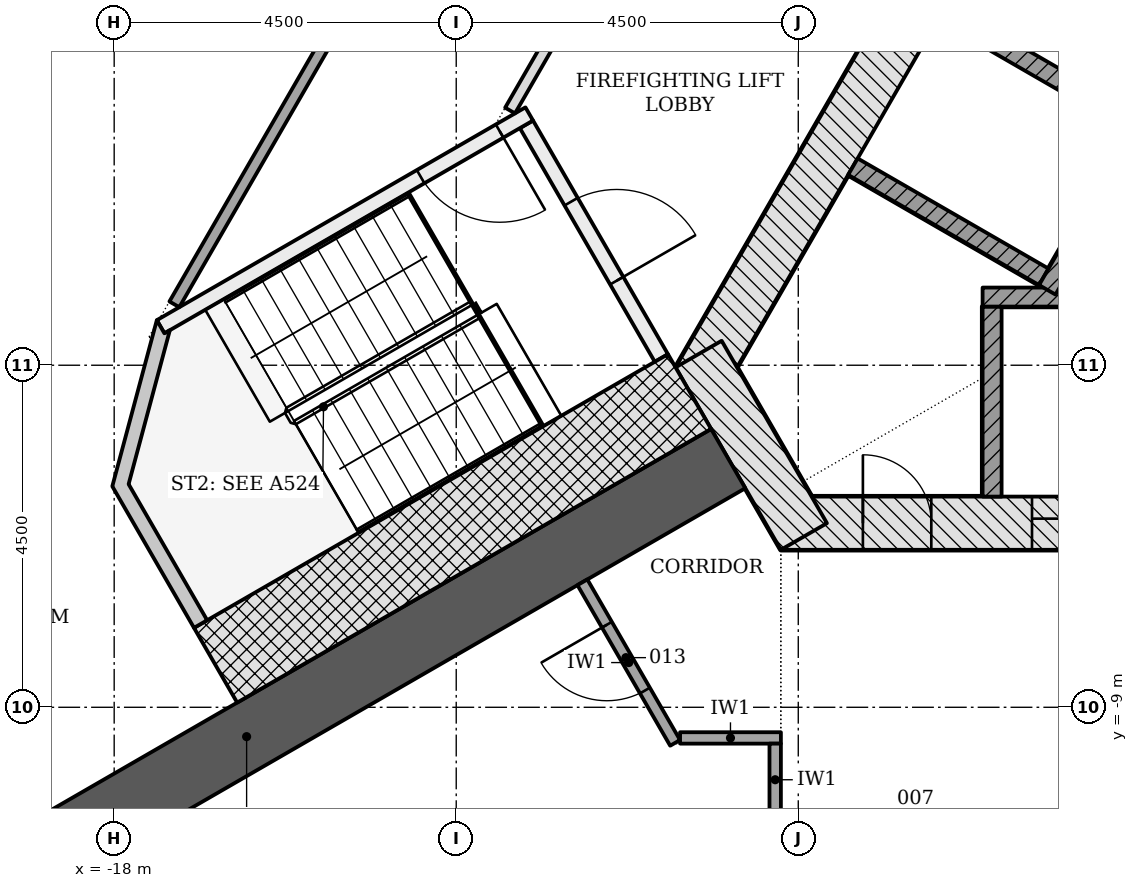
"""IFC4 building model, lengths in metres.
Left out: names, types, materials, properties, quantities, classifications, styles, units other than length and angle.
Written with IfcOpenShell. Run it as: python <this file> out.ifc"""

import sys

from ifc_helpers import new_model, si_unit, direction, frame, frame_2d, origin, place, context, subcontext, project, spatial, polyline, rectangle, outline, extrude, element, fill, save


model = new_model("IFC4")
c1 = context("Model", 3, precision=1e-05, world=origin(), true_north=direction((0.0, 1.0)))
c2 = subcontext(c1, "Body", "Model", "MODEL_VIEW")
j1 = project(units=[si_unit("LENGTHUNIT", "METRE"), si_unit("PLANEANGLEUNIT", "RADIAN")], contexts=[c1])
p1 = place(None, origin())
s1 = spatial("IfcSite", under=j1, at=p1, CompositionType="ELEMENT")
p2 = place(p1, origin())
s2 = spatial("IfcBuilding", under=s1, at=p2, CompositionType="ELEMENT")
p3 = place(p2, frame((0.0, 0.0, 24.0)))
s3 = spatial("IfcBuildingStorey", under=s2, at=p3, CompositionType="ELEMENT", Elevation=24.0)
p4 = place(p3, frame((-9.229, -6.578, -0.2), z_axis=(0.0, 0.0, 1.0), x_axis=(1.0, 0.0, 0.0)))
e1 = element("IfcWall", 1, at=p4, inside=s3, PredefinedType="SHEAR", context=c2, shape_type="SweptSolid", body=[
    extrude(rectangle(XDim=18.458, YDim=0.7, at=frame_2d((9.229, 0.0))), origin(), (0.0, 0.0, 1.0), 3.6),
])
p5 = place(p4, frame((3.304, 0.0, 0.2)))
e2 = element("IfcOpeningElement", 2, at=p5, cuts=e1, PredefinedType="OPENING", context=c2, shape_type="SweptSolid", body=[
    extrude(rectangle(XDim=1.1, YDim=2.1, at=frame_2d((0.55, 1.05))), frame((0.0, 0.36, 0.0), z_axis=(0.0, -1.0, 0.0), x_axis=(1.0, 0.0, 0.0)), (0.0, 0.0, 1.0), 0.72),
])
p6 = place(p4, frame((5.454, 0.0, 0.2)))
e3 = element("IfcOpeningElement", 3, at=p6, cuts=e1, PredefinedType="OPENING", context=c2, shape_type="SweptSolid", body=[
    extrude(rectangle(XDim=1.1, YDim=2.1, at=frame_2d((0.55, 1.05))), frame((0.0, 0.36, 0.0), z_axis=(0.0, -1.0, 0.0), x_axis=(1.0, 0.0, 0.0)), (0.0, 0.0, 1.0), 0.72),
])
p7 = place(p4, frame((7.604, 0.0, 0.2)))
e4 = element("IfcOpeningElement", 4, at=p7, cuts=e1, PredefinedType="OPENING", context=c2, shape_type="SweptSolid", body=[
    extrude(rectangle(XDim=1.1, YDim=2.1, at=frame_2d((0.55, 1.05))), frame((0.0, 0.36, 0.0), z_axis=(0.0, -1.0, 0.0), x_axis=(1.0, 0.0, 0.0)), (0.0, 0.0, 1.0), 0.72),
])
p8 = place(p4, frame((9.754, 0.0, 0.2)))
e5 = element("IfcOpeningElement", 5, at=p8, cuts=e1, PredefinedType="OPENING", context=c2, shape_type="SweptSolid", body=[
    extrude(rectangle(XDim=1.1, YDim=2.1, at=frame_2d((0.55, 1.05))), frame((0.0, 0.36, 0.0), z_axis=(0.0, -1.0, 0.0), x_axis=(1.0, 0.0, 0.0)), (0.0, 0.0, 1.0), 0.72),
])
p9 = place(p4, frame((11.904, 0.0, 0.2)))
e6 = element("IfcOpeningElement", 6, at=p9, cuts=e1, PredefinedType="OPENING", context=c2, shape_type="SweptSolid", body=[
    extrude(rectangle(XDim=1.1, YDim=2.1, at=frame_2d((0.55, 1.05))), frame((0.0, 0.36, 0.0), z_axis=(0.0, -1.0, 0.0), x_axis=(1.0, 0.0, 0.0)), (0.0, 0.0, 1.0), 0.72),
])
p10 = place(p4, frame((14.054, 0.0, 0.2)))
e7 = element("IfcOpeningElement", 7, at=p10, cuts=e1, PredefinedType="OPENING", context=c2, shape_type="SweptSolid", body=[
    extrude(rectangle(XDim=1.1, YDim=2.1, at=frame_2d((0.55, 1.05))), frame((0.0, 0.36, 0.0), z_axis=(0.0, -1.0, 0.0), x_axis=(1.0, 0.0, 0.0)), (0.0, 0.0, 1.0), 0.72),
])
p11 = place(p4, frame((1.079, 0.0, 0.2)))
e8 = element("IfcOpeningElement", 8, at=p11, cuts=e1, PredefinedType="OPENING", context=c2, shape_type="SweptSolid", body=[
    extrude(rectangle(XDim=0.9, YDim=2.1, at=frame_2d((0.45, 1.05))), frame((0.0, 0.36, 0.0), z_axis=(0.0, -1.0, 0.0), x_axis=(1.0, 0.0, 0.0)), (0.0, 0.0, 1.0), 0.72),
])
p12 = place(p3, frame((-1.083, 11.281, -0.2), z_axis=(0.0, 0.0, 1.0), x_axis=(-0.500001446645, -0.866024568562, 0.0)))
e9 = element("IfcWall", 9, at=p12, inside=s3, PredefinedType="SHEAR", context=c2, shape_type="SweptSolid", body=[
    extrude(rectangle(XDim=18.458, YDim=0.7, at=frame_2d((9.229, 0.0))), origin(), (0.0, 0.0, 1.0), 3.6),
])
p13 = place(p12, frame((8.979, 0.0, 0.2)))
e10 = element("IfcOpeningElement", 10, at=p13, cuts=e9, PredefinedType="OPENING", context=c2, shape_type="SweptSolid", body=[
    extrude(rectangle(XDim=1.2, YDim=2.1, at=frame_2d((0.6, 1.05))), frame((0.0, 0.36, 0.0), z_axis=(0.0, -1.0, 0.0), x_axis=(1.0, 0.0, 0.0)), (0.0, 0.0, 1.0), 0.72),
])
p14 = place(p12, frame((11.029, 0.0, 0.2)))
e11 = element("IfcOpeningElement", 11, at=p14, cuts=e9, PredefinedType="OPENING", context=c2, shape_type="SweptSolid", body=[
    extrude(rectangle(XDim=1.2, YDim=2.1, at=frame_2d((0.6, 1.05))), frame((0.0, 0.36, 0.0), z_axis=(0.0, -1.0, 0.0), x_axis=(1.0, 0.0, 0.0)), (0.0, 0.0, 1.0), 0.72),
])
p15 = place(p3, frame((-10.311, -4.353, -0.2), z_axis=(0.0, 0.0, 1.0), x_axis=(0.500042739161, -0.866000726912, 0.0)))
e12 = element("IfcWall", 12, at=p15, inside=s3, PredefinedType="SHEAR", context=c2, shape_type="SweptSolid", body=[
    extrude(rectangle(XDim=2.771, YDim=0.7, at=frame_2d((1.386, 0.0))), origin(), (0.0, 0.0, 1.0), 3.6),
])
p16 = place(p3, frame((-9.922, -5.728, -0.2), z_axis=(0.0, 0.0, 1.0), x_axis=(-0.866028046028, -0.499995423472, 0.0)))
e13 = element("IfcWall", 13, at=p16, inside=s3, PredefinedType="SHEAR", context=c2, shape_type="SweptSolid", body=[
    extrude(rectangle(XDim=14.633, YDim=0.9, at=frame_2d((7.316, 0.0))), origin(), (0.0, 0.0, 1.0), 3.6),
])
p17 = place(p3, frame((-6.45, -6.228, -0.2), z_axis=(0.0, 0.0, 1.0), x_axis=(0.0, 1.0, 0.0)))
e14 = element("IfcWall", 14, at=p17, inside=s3, PredefinedType="PARTITIONING", context=c2, shape_type="SweptSolid", body=[
    extrude(rectangle(XDim=2.5, YDim=0.25, at=frame_2d((1.25, 0.0))), origin(), (0.0, 0.0, 1.0), 3.6),
])
p18 = place(p3, frame((-6.575, -3.603, 0.0), z_axis=(0.0, 0.0, 1.0), x_axis=(1.0, 0.0, 0.0)))
e15 = element("IfcWall", 15, at=p18, inside=s3, PredefinedType="PARTITIONING", context=c2, shape_type="SweptSolid", body=[
    extrude(rectangle(XDim=13.15, YDim=0.25, at=frame_2d((6.575, 0.0))), origin(), (0.0, 0.0, 1.0), 3.4),
])
for number, where, z_axis, x_axis in (
    (16, (-7.106, 0.148, -0.2), (0.0, 0.0, 1.0), (0.866, -0.5, 0.0)),
    (17, (-8.281, -1.887, -0.2), (0.0, 0.0, 1.0), (0.866, -0.5, 0.0)),
):
    element("IfcWall", number, at=place(p3, frame(where, z_axis=z_axis, x_axis=x_axis)), inside=s3, PredefinedType="PARTITIONING", context=c2, shape_type="SweptSolid", body=[
        extrude(rectangle(XDim=2.9, YDim=0.25, at=frame_2d((1.45, 0.0))), origin(), (0.0, 0.0, 1.0), 3.6),
    ])
p19 = place(p3, frame((0.176, 6.711, 0.0), z_axis=(0.0, 0.0, 1.0), x_axis=(-0.500004227369, -0.866022963098, 0.0)))
e18 = element("IfcWall", 18, at=p19, inside=s3, PredefinedType="PARTITIONING", context=c2, shape_type="SweptSolid", body=[
    extrude(rectangle(XDim=11.8, YDim=0.25, at=frame_2d((5.9, 0.0))), origin(), (0.0, 0.0, 1.0), 3.4),
])
p20 = place(p3, frame((-12.576, -1.331, -0.2), z_axis=(0.0, 0.0, 1.0), x_axis=(0.499970499736, -0.8660424351, 0.0)))
e19 = element("IfcWall", 19, at=p20, inside=s3, PredefinedType="SHEAR", context=c2, shape_type="SweptSolid", body=[
    extrude(rectangle(XDim=3.55, YDim=0.2, at=frame_2d((1.775, 0.0))), origin(), (0.0, 0.0, 1.0), 3.6),
])
p21 = place(p20, frame((1.175, 0.0, 0.2)))
e20 = element("IfcOpeningElement", 20, at=p21, cuts=e19, PredefinedType="OPENING", context=c2, shape_type="SweptSolid", body=[
    extrude(rectangle(XDim=1.2, YDim=2.1, at=frame_2d((0.6, 1.05))), frame((0.0, 0.11, 0.0), z_axis=(0.0, -1.0, 0.0), x_axis=(1.0, 0.0, 0.0)), (0.0, 0.0, 1.0), 0.22),
])
p22 = place(p3, frame((-12.539, -1.194, -0.2), z_axis=(0.0, 0.0, 1.0), x_axis=(-0.866045472092, -0.499965239061, 0.0)))
e21 = element("IfcWall", 21, at=p22, inside=s3, PredefinedType="SHEAR", context=c2, shape_type="SweptSolid", body=[
    extrude(rectangle(XDim=5.6, YDim=0.2, at=frame_2d((2.8, 0.0))), origin(), (0.0, 0.0, 1.0), 3.6),
])
p23 = place(p22, frame((0.45, 0.0, 0.2)))
e22 = element("IfcOpeningElement", 22, at=p23, cuts=e21, PredefinedType="OPENING", context=c2, shape_type="SweptSolid", body=[
    extrude(rectangle(XDim=1.2, YDim=2.1, at=frame_2d((0.6, 1.05))), frame((0.0, 0.11, 0.0), z_axis=(0.0, -1.0, 0.0), x_axis=(1.0, 0.0, 0.0)), (0.0, 0.0, 1.0), 0.22),
])
p24 = place(p3, frame((-10.43, -4.847, -0.2), z_axis=(0.0, 0.0, 1.0), x_axis=(-0.866018442252, -0.500012057535, 0.0)))
e23 = element("IfcWall", 23, at=p24, inside=s3, PredefinedType="SHEAR", context=c2, shape_type="SweptSolid", body=[
    extrude(rectangle(XDim=7.2, YDim=1.136, at=frame_2d((3.6, 0.0))), origin(), (0.0, 0.0, 1.0), 3.6),
])
p25 = place(p3, frame((0.0, 0.0, -0.2)))
e24 = element("IfcWall", 24, at=p25, inside=s3, PredefinedType="SHEAR", context=c2, shape_type="SweptSolid", body=[
    extrude(outline(polyline([(-17.439, -3.907), (-18.025, -6.093), (-16.95, -7.955), (-16.777, -7.855), (-17.81, -6.065), (-17.267, -4.039), (-17.339, -4.081), (-17.339, -4.081), (-17.339, -4.081), (-17.339, -4.081), (-17.339, -4.081), (-17.339, -4.081), (-17.339, -4.081), (-17.339, -4.081), (-17.339, -4.081), (-17.339, -4.081), (-17.339, -4.081), (-17.339, -4.081), (-17.339, -4.081), (-17.339, -4.081), (-17.339, -4.081), (-17.339, -4.081), (-17.339, -4.081), (-17.439, -3.907)])), origin(), (0.0, 0.0, 1.0), 3.6),
])
p26 = place(p3, frame((-17.208, -3.699, 0.0), z_axis=(0.0, 0.0, 1.0), x_axis=(0.499997567621, 0.866026808115, 0.0)))
e25 = element("IfcWall", 25, at=p26, inside=s3, PredefinedType="PARTITIONING", context=c2, shape_type="SweptSolid", body=[
    extrude(rectangle(XDim=23.736, YDim=0.15, at=frame_2d((11.868, 0.0))), origin(), (0.0, 0.0, 1.0), 2.768),
])
p27 = place(p26, frame((16.656, 0.0, 0.0)))
e26 = element("IfcOpeningElement", 26, at=p27, cuts=e25, PredefinedType="OPENING", context=c2, shape_type="SweptSolid", body=[
    extrude(rectangle(XDim=1.1, YDim=2.1, at=frame_2d((0.55, 1.05))), frame((0.0, 0.085, 0.0), z_axis=(0.0, -1.0, 0.0), x_axis=(1.0, 0.0, 0.0)), (0.0, 0.0, 1.0), 0.17),
])
p28 = place(p26, frame((14.662, 0.0, 0.0)))
e27 = element("IfcOpeningElement", 27, at=p28, cuts=e25, PredefinedType="OPENING", context=c2, shape_type="SweptSolid", body=[
    extrude(rectangle(XDim=1.1, YDim=2.1, at=frame_2d((0.55, 1.05))), frame((0.0, 0.085, 0.0), z_axis=(0.0, -1.0, 0.0), x_axis=(1.0, 0.0, 0.0)), (0.0, 0.0, 1.0), 0.17),
])
p29 = place(p26, frame((5.273, 0.0, 0.0)))
e28 = element("IfcOpeningElement", 28, at=p29, cuts=e25, PredefinedType="OPENING", context=c2, shape_type="SweptSolid", body=[
    extrude(rectangle(XDim=1.0, YDim=2.1, at=frame_2d((0.5, 1.05))), frame((0.0, 0.085, 0.0), z_axis=(0.0, -1.0, 0.0), x_axis=(1.0, 0.0, 0.0)), (0.0, 0.0, 1.0), 0.17),
])
p30 = place(p3, frame((-4.407, 13.374, 0.0), z_axis=(0.0, 0.0, 1.0), x_axis=(-0.499997181693, -0.866027030928, 0.0)))
e29 = element("IfcWall", 29, at=p30, inside=s3, PredefinedType="PARTITIONING", context=c2, shape_type="SweptSolid", body=[
    extrude(rectangle(XDim=16.77, YDim=0.15, at=frame_2d((8.385, 0.0))), origin(), (0.0, 0.0, 1.0), 2.768),
])
p31 = place(p30, frame((8.879, 0.0, 0.0)))
e30 = element("IfcOpeningElement", 30, at=p31, cuts=e29, PredefinedType="OPENING", context=c2, shape_type="SweptSolid", body=[
    extrude(rectangle(XDim=1.0, YDim=2.1, at=frame_2d((0.5, 1.05))), frame((0.0, 0.085, 0.0), z_axis=(0.0, -1.0, 0.0), x_axis=(1.0, 0.0, 0.0)), (0.0, 0.0, 1.0), 0.17),
])
p32 = place(p3, frame((-10.62, -9.468, 0.0), z_axis=(0.0, 0.0, 1.0), x_axis=(-0.500045838785, 0.865998937132, 0.0)))
e31 = element("IfcWall", 31, at=p32, inside=s3, PredefinedType="PARTITIONING", context=c2, shape_type="SweptSolid", body=[
    extrude(rectangle(XDim=2.44, YDim=0.15, at=frame_2d((1.22, 0.0))), origin(), (0.0, 0.0, 1.0), 3.4),
])
p33 = place(p32, frame((0.795, 0.0, 0.0)))
e32 = element("IfcOpeningElement", 32, at=p33, cuts=e31, PredefinedType="OPENING", context=c2, shape_type="SweptSolid", body=[
    extrude(rectangle(XDim=1.0, YDim=2.1, at=frame_2d((0.5, 1.05))), frame((0.0, 0.085, 0.0), z_axis=(0.0, -1.0, 0.0), x_axis=(1.0, 0.0, 0.0)), (0.0, 0.0, 1.0), 0.17),
])
p34 = place(p3, frame((-10.555, -9.403, 0.0), z_axis=(0.0, 0.0, 1.0), x_axis=(1.0, 0.0, 0.0)))
e33 = element("IfcWall", 33, at=p34, inside=s3, PredefinedType="PARTITIONING", context=c2, shape_type="SweptSolid", body=[
    extrude(rectangle(XDim=1.326, YDim=0.15, at=frame_2d((0.663, 0.0))), origin(), (0.0, 0.0, 1.0), 3.4),
])
p35 = place(p3, frame((-9.304, -10.428, 0.0), z_axis=(0.0, 0.0, 1.0), x_axis=(0.0, 1.0, 0.0)))
e34 = element("IfcWall", 34, at=p35, inside=s3, PredefinedType="PARTITIONING", context=c2, shape_type="SweptSolid", body=[
    extrude(rectangle(XDim=0.95, YDim=0.15, at=frame_2d((0.475, 0.0))), origin(), (0.0, 0.0, 1.0), 3.4),
])
p36 = place(p5, origin())
e35 = element("IfcDoor", 35, at=p36, inside=s3, OperationType="DOUBLE_DOOR_SLIDING", PredefinedType="DOOR", context=c2, shape_type="SweptSolid", body=[
    extrude(rectangle(XDim=1.1, YDim=2.1, at=frame_2d((0.55, 1.05))), frame((0.0, 0.025, 0.0), z_axis=(0.0, -1.0, 0.0), x_axis=(1.0, 0.0, 0.0)), (0.0, 0.0, 1.0), 0.05),
])
fill(e2, e35)
p37 = place(p11, origin())
e36 = element("IfcDoor", 36, at=p37, inside=s3, OperationType="SINGLE_SWING_LEFT", PredefinedType="DOOR", context=c2, shape_type="SweptSolid", body=[
    extrude(rectangle(XDim=0.9, YDim=2.1, at=frame_2d((0.45, 1.05))), frame((0.0, 0.075, 0.0), z_axis=(0.0, -1.0, 0.0), x_axis=(1.0, 0.0, 0.0)), (0.0, 0.0, 1.0), 0.15),
])
fill(e8, e36)
p38 = place(p21, origin())
e37 = element("IfcDoor", 37, at=p38, inside=s3, OperationType="SINGLE_SWING_RIGHT", PredefinedType="DOOR", context=c2, shape_type="SweptSolid", body=[
    extrude(rectangle(XDim=1.2, YDim=2.1, at=frame_2d((0.6, 1.05))), frame((0.0, 0.025, 0.0), z_axis=(0.0, -1.0, 0.0), x_axis=(1.0, 0.0, 0.0)), (0.0, 0.0, 1.0), 0.05),
])
fill(e20, e37)
p39 = place(p23, origin())
e38 = element("IfcDoor", 38, at=p39, inside=s3, OperationType="SINGLE_SWING_LEFT", PredefinedType="DOOR", context=c2, shape_type="SweptSolid", body=[
    extrude(rectangle(XDim=1.2, YDim=2.1, at=frame_2d((0.6, 1.05))), frame((0.0, 0.025, 0.0), z_axis=(0.0, -1.0, 0.0), x_axis=(1.0, 0.0, 0.0)), (0.0, 0.0, 1.0), 0.05),
])
fill(e22, e38)
p40 = place(p33, origin())
e39 = element("IfcDoor", 39, at=p40, inside=s3, OperationType="SINGLE_SWING_RIGHT", PredefinedType="DOOR", context=c2, shape_type="SweptSolid", body=[
    extrude(rectangle(XDim=1.0, YDim=2.1, at=frame_2d((0.5, 1.05))), frame((0.0, 0.025, 0.0), z_axis=(0.0, -1.0, 0.0), x_axis=(1.0, 0.0, 0.0)), (0.0, 0.0, 1.0), 0.05),
])
fill(e32, e39)
save(model, sys.argv[1])
